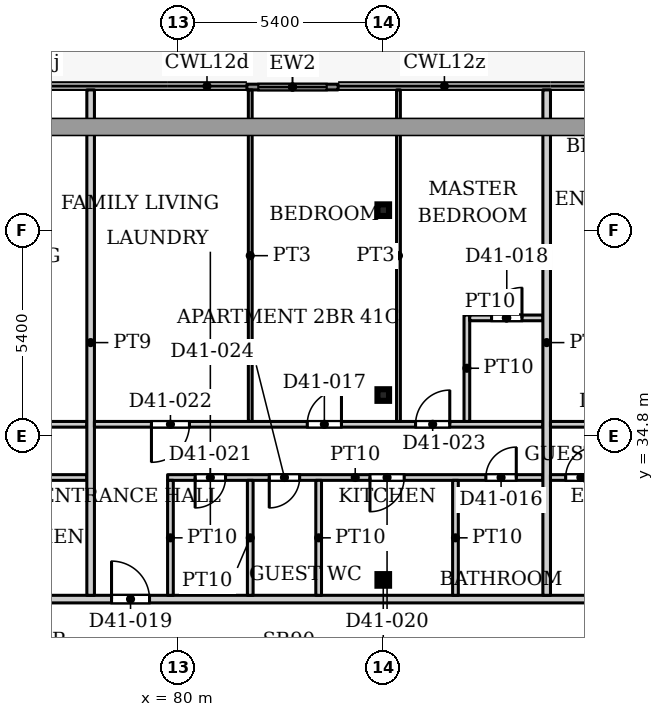
"""IFC4 building model, lengths in metres.
Left out: names, types, materials, properties, quantities, classifications, styles, units other than length and angle.
Written with IfcOpenShell. Run it as: python <this file> out.ifc"""

import sys

from ifc_helpers import new_model, si_unit, direction, frame, frame_2d, origin, origin_2d, place, context, subcontext, project, spatial, rectangle, hollow_rectangle, extrude, source, transform, mapped, element, fill, save


model = new_model("IFC4")
c1 = context("Model", 3, precision=1e-05, world=origin(), true_north=direction((0.0, 1.0)))
c2 = subcontext(c1, "Body", "Model", "MODEL_VIEW")
j1 = project(units=[si_unit("LENGTHUNIT", "METRE"), si_unit("PLANEANGLEUNIT", "RADIAN")], contexts=[c1])
p1 = place(None, origin())
s1 = spatial("IfcSite", under=j1, at=p1, CompositionType="ELEMENT")
p2 = place(p1, origin())
s2 = spatial("IfcBuilding", under=s1, at=p2, CompositionType="ELEMENT")
p3 = place(p2, frame((0.0, 0.0, 176.0)))
s3 = spatial("IfcBuildingStorey", under=s2, at=p3, CompositionType="ELEMENT", Elevation=176.0)
for number, where, z_axis, x_axis in (
    (1, (85.4, 31.005, 0.0), (0.0, 0.0, 1.0), (1.0, 0.0, 0.0)),
    (2, (85.4, 35.87, 0.0), (0.0, 0.0, 1.0), (1.0, 0.0, 0.0)),
    (3, (85.4, 40.735, 0.0), (0.0, 0.0, 1.0), (1.0, 0.0, 0.0)),
):
    element("IfcColumn", number, at=place(p3, frame(where, z_axis=z_axis, x_axis=x_axis)), inside=s3, PredefinedType="COLUMN", context=c2, shape_type="SweptSolid", body=[
        extrude(hollow_rectangle(XDim=0.305, YDim=0.305, WallThickness=0.016, InnerFilletRadius=0.016, OuterFilletRadius=0.032, at=origin_2d()), origin(), (0.0, 0.0, 1.0), 3.9),
    ])
p4 = place(p3, frame((81.812, 43.975, 0.0), z_axis=(0.0, 0.0, 1.0), x_axis=(1.0, 0.0, 0.0)))
e4 = element("IfcWall", 4, at=p4, inside=s3, PredefinedType="SOLIDWALL", context=c2, shape_type="SweptSolid", body=[
    extrude(rectangle(XDim=2.4, YDim=0.15, at=frame_2d((1.2, 0.0))), origin(), (0.0, 0.0, 1.0), 3.75),
])
p5 = place(p4, frame((0.3, 0.0, 0.0)))
e5 = element("IfcOpeningElement", 5, at=p5, cuts=e4, PredefinedType="OPENING", context=c2, shape_type="SweptSolid", body=[
    extrude(rectangle(XDim=1.8, YDim=2.4, at=frame_2d((0.9, 1.2))), frame((0.0, 0.085, 0.0), z_axis=(0.0, -1.0, 0.0), x_axis=(1.0, 0.0, 0.0)), (0.0, 0.0, 1.0), 0.17),
])
p6 = place(p3, frame((53.549, 30.5, 0.0), z_axis=(0.0, 0.0, 1.0), x_axis=(1.0, 0.0, 0.0)))
e6 = element("IfcWall", 6, at=p6, inside=s3, PredefinedType="PARTITIONING", context=c2, shape_type="SweptSolid", body=[
    extrude(rectangle(XDim=44.551, YDim=0.2, at=frame_2d((22.275, 0.0))), origin(), (0.0, 0.0, 1.0), 3.6),
])
p7 = place(p6, frame((6.851, 0.0, 0.0)))
e7 = element("IfcOpeningElement", 7, at=p7, cuts=e6, PredefinedType="OPENING", context=c2, shape_type="SweptSolid", body=[
    extrude(rectangle(XDim=1.0, YDim=2.1, at=frame_2d((0.5, 1.05))), frame((0.0, 0.11, 0.0), z_axis=(0.0, -1.0, 0.0), x_axis=(1.0, 0.0, 0.0)), (0.0, 0.0, 1.0), 0.22),
])
p8 = place(p6, frame((13.451, 0.0, 0.0)))
e8 = element("IfcOpeningElement", 8, at=p8, cuts=e6, PredefinedType="OPENING", context=c2, shape_type="SweptSolid", body=[
    extrude(rectangle(XDim=1.0, YDim=2.1, at=frame_2d((0.5, 1.05))), frame((0.0, 0.11, 0.0), z_axis=(0.0, -1.0, 0.0), x_axis=(1.0, 0.0, 0.0)), (0.0, 0.0, 1.0), 0.22),
])
p9 = place(p6, frame((24.701, 0.0, 0.0)))
e9 = element("IfcOpeningElement", 9, at=p9, cuts=e6, PredefinedType="OPENING", context=c2, shape_type="SweptSolid", body=[
    extrude(rectangle(XDim=1.0, YDim=2.1, at=frame_2d((0.5, 1.05))), frame((0.0, 0.11, 0.0), z_axis=(0.0, -1.0, 0.0), x_axis=(1.0, 0.0, 0.0)), (0.0, 0.0, 1.0), 0.22),
])
p10 = place(p6, frame((38.651, 0.0, 0.0)))
e10 = element("IfcOpeningElement", 10, at=p10, cuts=e6, PredefinedType="OPENING", context=c2, shape_type="SweptSolid", body=[
    extrude(rectangle(XDim=1.0, YDim=2.1, at=frame_2d((0.5, 1.05))), frame((0.0, 0.11, 0.0), z_axis=(0.0, -1.0, 0.0), x_axis=(1.0, 0.0, 0.0)), (0.0, 0.0, 1.0), 0.22),
])
p11 = place(p3, frame((63.4, 35.1, 0.0), z_axis=(0.0, 0.0, 1.0), x_axis=(1.0, 0.0, 0.0)))
e11 = element("IfcWall", 11, at=p11, inside=s3, PredefinedType="PARTITIONING", context=c2, shape_type="SweptSolid", body=[
    extrude(rectangle(XDim=14.2, YDim=0.15, at=frame_2d((7.1, 0.0))), origin(), (0.0, 0.0, 1.0), 3.6),
])
p12 = place(p11, frame((1.4, 0.0, 0.0)))
e12 = element("IfcOpeningElement", 12, at=p12, cuts=e11, PredefinedType="OPENING", context=c2, shape_type="SweptSolid", body=[
    extrude(rectangle(XDim=0.9, YDim=2.1, at=frame_2d((0.45, 1.05))), frame((0.0, 0.085, 0.0), z_axis=(0.0, -1.0, 0.0), x_axis=(1.0, 0.0, 0.0)), (0.0, 0.0, 1.0), 0.17),
])
p13 = place(p11, frame((10.95, 0.0, 0.0)))
e13 = element("IfcOpeningElement", 13, at=p13, cuts=e11, PredefinedType="OPENING", context=c2, shape_type="SweptSolid", body=[
    extrude(rectangle(XDim=1.0, YDim=2.1, at=frame_2d((0.5, 1.05))), frame((0.0, 0.085, 0.0), z_axis=(0.0, -1.0, 0.0), x_axis=(1.0, 0.0, 0.0)), (0.0, 0.0, 1.0), 0.17),
])
p14 = place(p11, frame((6.8, 0.0, 0.0)))
e14 = element("IfcOpeningElement", 14, at=p14, cuts=e11, PredefinedType="OPENING", context=c2, shape_type="SweptSolid", body=[
    extrude(rectangle(XDim=0.9, YDim=2.1, at=frame_2d((0.45, 1.05))), frame((0.0, 0.085, 0.0), z_axis=(0.0, -1.0, 0.0), x_axis=(1.0, 0.0, 0.0)), (0.0, 0.0, 1.0), 0.17),
])
p15 = place(p3, frame((69.525, 33.7, 0.0), z_axis=(0.0, 0.0, 1.0), x_axis=(1.0, 0.0, 0.0)))
e15 = element("IfcWall", 15, at=p15, inside=s3, PredefinedType="PARTITIONING", context=c2, shape_type="SweptSolid", body=[
    extrude(rectangle(XDim=8.075, YDim=0.15, at=frame_2d((4.038, 0.0))), origin(), (0.0, 0.0, 1.0), 3.6),
])
p16 = place(p15, frame((4.625, 0.0, 0.0)))
e16 = element("IfcOpeningElement", 16, at=p16, cuts=e15, PredefinedType="OPENING", context=c2, shape_type="SweptSolid", body=[
    extrude(rectangle(XDim=0.9, YDim=2.1, at=frame_2d((0.45, 1.05))), frame((0.0, 0.085, 0.0), z_axis=(0.0, -1.0, 0.0), x_axis=(1.0, 0.0, 0.0)), (0.0, 0.0, 1.0), 0.17),
])
p17 = place(p15, frame((1.175, 0.0, 0.0)))
e17 = element("IfcOpeningElement", 17, at=p17, cuts=e15, PredefinedType="OPENING", context=c2, shape_type="SweptSolid", body=[
    extrude(rectangle(XDim=0.8, YDim=2.1, at=frame_2d((0.4, 1.05))), frame((0.0, 0.085, 0.0), z_axis=(0.0, -1.0, 0.0), x_axis=(1.0, 0.0, 0.0)), (0.0, 0.0, 1.0), 0.17),
])
p18 = place(p3, frame((77.7, 30.6, 0.0), z_axis=(0.0, 0.0, 1.0), x_axis=(0.0, 1.0, 0.0)))
e18 = element("IfcWall", 18, at=p18, inside=s3, PredefinedType="PARTITIONING", context=c2, shape_type="SweptSolid", body=[
    extrude(rectangle(XDim=13.3, YDim=0.2, at=frame_2d((6.65, 0.0))), origin(), (0.0, 0.0, 1.0), 3.6),
])
p19 = place(p3, frame((77.8, 35.1, 0.0), z_axis=(0.0, 0.0, 1.0), x_axis=(1.0, 0.0, 0.0)))
e19 = element("IfcWall", 19, at=p19, inside=s3, PredefinedType="PARTITIONING", context=c2, shape_type="SweptSolid", body=[
    extrude(rectangle(XDim=11.8, YDim=0.15, at=frame_2d((5.9, 0.0))), origin(), (0.0, 0.0, 1.0), 3.6),
])
p20 = place(p19, frame((5.6, 0.0, 0.0)))
e20 = element("IfcOpeningElement", 20, at=p20, cuts=e19, PredefinedType="OPENING", context=c2, shape_type="SweptSolid", body=[
    extrude(rectangle(XDim=0.9, YDim=2.1, at=frame_2d((0.45, 1.05))), frame((0.0, 0.085, 0.0), z_axis=(0.0, -1.0, 0.0), x_axis=(1.0, 0.0, 0.0)), (0.0, 0.0, 1.0), 0.17),
])
p21 = place(p19, frame((1.5, 0.0, 0.0)))
e21 = element("IfcOpeningElement", 21, at=p21, cuts=e19, PredefinedType="OPENING", context=c2, shape_type="SweptSolid", body=[
    extrude(rectangle(XDim=1.0, YDim=2.1, at=frame_2d((0.5, 1.05))), frame((0.0, 0.085, 0.0), z_axis=(0.0, -1.0, 0.0), x_axis=(1.0, 0.0, 0.0)), (0.0, 0.0, 1.0), 0.17),
])
p22 = place(p19, frame((8.45, 0.0, 0.0)))
e22 = element("IfcOpeningElement", 22, at=p22, cuts=e19, PredefinedType="OPENING", context=c2, shape_type="SweptSolid", body=[
    extrude(rectangle(XDim=0.9, YDim=2.1, at=frame_2d((0.45, 1.05))), frame((0.0, 0.085, 0.0), z_axis=(0.0, -1.0, 0.0), x_axis=(1.0, 0.0, 0.0)), (0.0, 0.0, 1.0), 0.17),
])
p23 = place(p3, frame((79.725, 33.7, 0.0), z_axis=(0.0, 0.0, 1.0), x_axis=(1.0, 0.0, 0.0)))
e23 = element("IfcWall", 23, at=p23, inside=s3, PredefinedType="PARTITIONING", context=c2, shape_type="SweptSolid", body=[
    extrude(rectangle(XDim=9.875, YDim=0.15, at=frame_2d((4.938, 0.0))), origin(), (0.0, 0.0, 1.0), 3.6),
])
p24 = place(p23, frame((8.375, 0.0, 0.0)))
e24 = element("IfcOpeningElement", 24, at=p24, cuts=e23, PredefinedType="OPENING", context=c2, shape_type="SweptSolid", body=[
    extrude(rectangle(XDim=0.8, YDim=2.1, at=frame_2d((0.4, 1.05))), frame((0.0, 0.085, 0.0), z_axis=(0.0, -1.0, 0.0), x_axis=(1.0, 0.0, 0.0)), (0.0, 0.0, 1.0), 0.17),
])
p25 = place(p23, frame((5.325, 0.0, 0.0)))
e25 = element("IfcOpeningElement", 25, at=p25, cuts=e23, PredefinedType="OPENING", context=c2, shape_type="SweptSolid", body=[
    extrude(rectangle(XDim=0.9, YDim=2.1, at=frame_2d((0.45, 1.05))), frame((0.0, 0.085, 0.0), z_axis=(0.0, -1.0, 0.0), x_axis=(1.0, 0.0, 0.0)), (0.0, 0.0, 1.0), 0.17),
])
p26 = place(p23, frame((0.725, 0.0, 0.0)))
e26 = element("IfcOpeningElement", 26, at=p26, cuts=e23, PredefinedType="OPENING", context=c2, shape_type="SweptSolid", body=[
    extrude(rectangle(XDim=0.8, YDim=2.1, at=frame_2d((0.4, 1.05))), frame((0.0, 0.085, 0.0), z_axis=(0.0, -1.0, 0.0), x_axis=(1.0, 0.0, 0.0)), (0.0, 0.0, 1.0), 0.17),
])
p27 = place(p23, frame((2.675, 0.0, 0.0)))
e27 = element("IfcOpeningElement", 27, at=p27, cuts=e23, PredefinedType="OPENING", context=c2, shape_type="SweptSolid", body=[
    extrude(rectangle(XDim=0.8, YDim=2.1, at=frame_2d((0.4, 1.05))), frame((0.0, 0.085, 0.0), z_axis=(0.0, -1.0, 0.0), x_axis=(1.0, 0.0, 0.0)), (0.0, 0.0, 1.0), 0.17),
])
for number, where, z_axis, x_axis in (
    (28, (79.8, 30.6, 0.0), (0.0, 0.0, 1.0), (0.0, 1.0, 0.0)),
    (29, (81.9, 30.6, 0.0), (0.0, 0.0, 1.0), (0.0, 1.0, 0.0)),
):
    element("IfcWall", number, at=place(p3, frame(where, z_axis=z_axis, x_axis=x_axis)), inside=s3, PredefinedType="PARTITIONING", context=c2, shape_type="SweptSolid", body=[
        extrude(rectangle(XDim=3.025, YDim=0.15, at=frame_2d((1.512, 0.0))), origin(), (0.0, 0.0, 1.0), 3.6),
    ])
p28 = place(p3, frame((81.9, 35.175, 0.0), z_axis=(0.0, 0.0, 1.0), x_axis=(0.0, 1.0, 0.0)))
e30 = element("IfcWall", 30, at=p28, inside=s3, PredefinedType="PARTITIONING", context=c2, shape_type="SweptSolid", body=[
    extrude(rectangle(XDim=8.725, YDim=0.1, at=frame_2d((4.362, 0.0))), origin(), (0.0, 0.0, 1.0), 3.6),
])
p29 = place(p3, frame((83.7, 30.6, 0.0), z_axis=(0.0, 0.0, 1.0), x_axis=(0.0, 1.0, 0.0)))
e31 = element("IfcWall", 31, at=p29, inside=s3, PredefinedType="PARTITIONING", context=c2, shape_type="SweptSolid", body=[
    extrude(rectangle(XDim=3.025, YDim=0.15, at=frame_2d((1.512, 0.0))), origin(), (0.0, 0.0, 1.0), 3.6),
])
p30 = place(p3, frame((85.8, 35.175, 0.0), z_axis=(0.0, 0.0, 1.0), x_axis=(0.0, 1.0, 0.0)))
e32 = element("IfcWall", 32, at=p30, inside=s3, PredefinedType="PARTITIONING", context=c2, shape_type="SweptSolid", body=[
    extrude(rectangle(XDim=8.725, YDim=0.1, at=frame_2d((4.362, 0.0))), origin(), (0.0, 0.0, 1.0), 3.6),
])
p31 = place(p3, frame((87.3, 30.6, 0.0), z_axis=(0.0, 0.0, 1.0), x_axis=(0.0, 1.0, 0.0)))
e33 = element("IfcWall", 33, at=p31, inside=s3, PredefinedType="PARTITIONING", context=c2, shape_type="SweptSolid", body=[
    extrude(rectangle(XDim=3.025, YDim=0.15, at=frame_2d((1.512, 0.0))), origin(), (0.0, 0.0, 1.0), 3.6),
])
p32 = place(p3, frame((87.6, 35.175, 0.0), z_axis=(0.0, 0.0, 1.0), x_axis=(0.0, 1.0, 0.0)))
e34 = element("IfcWall", 34, at=p32, inside=s3, PredefinedType="PARTITIONING", context=c2, shape_type="SweptSolid", body=[
    extrude(rectangle(XDim=2.8, YDim=0.15, at=frame_2d((1.4, 0.0))), origin(), (0.0, 0.0, 1.0), 3.6),
])
p33 = place(p3, frame((87.675, 37.9, 0.0), z_axis=(0.0, 0.0, 1.0), x_axis=(1.0, 0.0, 0.0)))
e35 = element("IfcWall", 35, at=p33, inside=s3, PredefinedType="PARTITIONING", context=c2, shape_type="SweptSolid", body=[
    extrude(rectangle(XDim=1.925, YDim=0.15, at=frame_2d((0.962, 0.0))), origin(), (0.0, 0.0, 1.0), 3.6),
])
p34 = place(p33, frame((0.575, 0.0, 0.0)))
e36 = element("IfcOpeningElement", 36, at=p34, cuts=e35, PredefinedType="OPENING", context=c2, shape_type="SweptSolid", body=[
    extrude(rectangle(XDim=0.8, YDim=2.1, at=frame_2d((0.4, 1.05))), frame((0.0, 0.085, 0.0), z_axis=(0.0, -1.0, 0.0), x_axis=(1.0, 0.0, 0.0)), (0.0, 0.0, 1.0), 0.17),
])
p35 = place(p3, frame((89.7, 30.6, 0.0), z_axis=(0.0, 0.0, 1.0), x_axis=(0.0, 1.0, 0.0)))
e37 = element("IfcWall", 37, at=p35, inside=s3, PredefinedType="PARTITIONING", context=c2, shape_type="SweptSolid", body=[
    extrude(rectangle(XDim=13.3, YDim=0.2, at=frame_2d((6.65, 0.0))), origin(), (0.0, 0.0, 1.0), 3.6),
])
p36 = place(p3, frame((89.8, 33.7, 0.0), z_axis=(0.0, 0.0, 1.0), x_axis=(1.0, 0.0, 0.0)))
e38 = element("IfcWall", 38, at=p36, inside=s3, PredefinedType="PARTITIONING", context=c2, shape_type="SweptSolid", body=[
    extrude(rectangle(XDim=1.625, YDim=0.15, at=frame_2d((0.812, 0.0))), origin(), (0.0, 0.0, 1.0), 3.6),
])
p37 = place(p36, frame((0.4, 0.0, 0.0)))
e39 = element("IfcOpeningElement", 39, at=p37, cuts=e38, PredefinedType="OPENING", context=c2, shape_type="SweptSolid", body=[
    extrude(rectangle(XDim=0.8, YDim=2.1, at=frame_2d((0.4, 1.05))), frame((0.0, 0.085, 0.0), z_axis=(0.0, -1.0, 0.0), x_axis=(1.0, 0.0, 0.0)), (0.0, 0.0, 1.0), 0.17),
])
p38 = place(p3, frame((89.8, 35.1, 0.0), z_axis=(0.0, 0.0, 1.0), x_axis=(1.0, 0.0, 0.0)))
e40 = element("IfcWall", 40, at=p38, inside=s3, PredefinedType="PARTITIONING", context=c2, shape_type="SweptSolid", body=[
    extrude(rectangle(XDim=10.1, YDim=0.15, at=frame_2d((5.05, 0.0))), origin(), (0.0, 0.0, 1.0), 3.6),
])
p39 = place(p38, frame((1.4, 0.0, 0.0)))
e41 = element("IfcOpeningElement", 41, at=p39, cuts=e40, PredefinedType="OPENING", context=c2, shape_type="SweptSolid", body=[
    extrude(rectangle(XDim=0.9, YDim=2.1, at=frame_2d((0.45, 1.05))), frame((0.0, 0.085, 0.0), z_axis=(0.0, -1.0, 0.0), x_axis=(1.0, 0.0, 0.0)), (0.0, 0.0, 1.0), 0.17),
])
p40 = place(p38, frame((6.45, 0.0, 0.0)))
e42 = element("IfcOpeningElement", 42, at=p40, cuts=e40, PredefinedType="OPENING", context=c2, shape_type="SweptSolid", body=[
    extrude(rectangle(XDim=1.0, YDim=2.1, at=frame_2d((0.5, 1.05))), frame((0.0, 0.085, 0.0), z_axis=(0.0, -1.0, 0.0), x_axis=(1.0, 0.0, 0.0)), (0.0, 0.0, 1.0), 0.17),
])
m1 = source(origin(), c2, "Body", "SweptSolid", [
    extrude(rectangle(XDim=1.8, YDim=2.4, at=frame_2d((0.9, 1.2))), frame((0.0, 0.025, 0.0), z_axis=(0.0, -1.0, 0.0), x_axis=(1.0, 0.0, 0.0)), (0.0, 0.0, 1.0), 0.05),
])
p41 = place(p5, origin())
e43 = element("IfcDoor", 43, at=p41, inside=s3, OperationType="SLIDING_TO_LEFT", PredefinedType="DOOR", context=c2, shape_type="MappedRepresentation", body=[
    mapped(m1, transform((0.0, 0.0, 0.0), x_axis=(1.0, 0.0, 0.0), y_axis=(0.0, 1.0, 0.0), z_axis=(0.0, 0.0, 1.0), scale=1.0)),
])
fill(e5, e43)
m2 = source(origin(), c2, "Body", "SweptSolid", [
    extrude(rectangle(XDim=0.8, YDim=2.1, at=frame_2d((0.4, 1.05))), frame((0.0, 0.025, 0.0), z_axis=(0.0, -1.0, 0.0), x_axis=(1.0, 0.0, 0.0)), (0.0, 0.0, 1.0), 0.05),
])
p42 = place(p24, origin())
e44 = element("IfcDoor", 44, at=p42, inside=s3, OperationType="SINGLE_SWING_LEFT", PredefinedType="DOOR", context=c2, shape_type="MappedRepresentation", body=[
    mapped(m2, transform((0.0, 0.0, 0.0), x_axis=(1.0, 0.0, 0.0), y_axis=(0.0, 1.0, 0.0), z_axis=(0.0, 0.0, 1.0), scale=1.0)),
])
fill(e24, e44)
m3 = source(origin(), c2, "Body", "SweptSolid", [
    extrude(rectangle(XDim=0.9, YDim=2.1, at=frame_2d((0.45, 1.05))), frame((0.0, 0.025, 0.0), z_axis=(0.0, -1.0, 0.0), x_axis=(1.0, 0.0, 0.0)), (0.0, 0.0, 1.0), 0.05),
])
p43 = place(p20, origin())
e45 = element("IfcDoor", 45, at=p43, inside=s3, OperationType="SINGLE_SWING_LEFT", PredefinedType="DOOR", context=c2, shape_type="MappedRepresentation", body=[
    mapped(m3, transform((0.0, 0.0, 0.0), x_axis=(1.0, 0.0, 0.0), y_axis=(0.0, 1.0, 0.0), z_axis=(0.0, 0.0, 1.0), scale=1.0)),
])
fill(e20, e45)
p44 = place(p34, origin())
e46 = element("IfcDoor", 46, at=p44, inside=s3, OperationType="SINGLE_SWING_LEFT", PredefinedType="DOOR", context=c2, shape_type="MappedRepresentation", body=[
    mapped(m2, transform((0.0, 0.0, 0.0), x_axis=(1.0, 0.0, 0.0), y_axis=(0.0, 1.0, 0.0), z_axis=(0.0, 0.0, 1.0), scale=1.0)),
])
fill(e36, e46)
m4 = source(origin(), c2, "Body", "SweptSolid", [
    extrude(rectangle(XDim=1.0, YDim=2.1, at=frame_2d((0.5, 1.05))), frame((0.0, 0.025, 0.0), z_axis=(0.0, -1.0, 0.0), x_axis=(1.0, 0.0, 0.0)), (0.0, 0.0, 1.0), 0.05),
])
p45 = place(p9, origin())
e47 = element("IfcDoor", 47, at=p45, inside=s3, OperationType="SINGLE_SWING_LEFT", PredefinedType="DOOR", context=c2, shape_type="MappedRepresentation", body=[
    mapped(m4, transform((0.0, 0.0, 0.0), x_axis=(1.0, 0.0, 0.0), y_axis=(0.0, 1.0, 0.0), z_axis=(0.0, 0.0, 1.0), scale=1.0)),
])
fill(e9, e47)
p46 = place(p25, origin())
e48 = element("IfcDoor", 48, at=p46, inside=s3, OperationType="SINGLE_SWING_RIGHT", PredefinedType="DOOR", context=c2, shape_type="MappedRepresentation", body=[
    mapped(m3, transform((0.0, 0.0, 0.0), x_axis=(1.0, 0.0, 0.0), y_axis=(0.0, 1.0, 0.0), z_axis=(0.0, 0.0, 1.0), scale=1.0)),
])
fill(e25, e48)
p47 = place(p26, origin())
e49 = element("IfcDoor", 49, at=p47, inside=s3, OperationType="SINGLE_SWING_RIGHT", PredefinedType="DOOR", context=c2, shape_type="MappedRepresentation", body=[
    mapped(m2, transform((0.0, 0.0, 0.0), x_axis=(1.0, 0.0, 0.0), y_axis=(0.0, 1.0, 0.0), z_axis=(0.0, 0.0, 1.0), scale=1.0)),
])
fill(e26, e49)
m5 = source(origin(), c2, "Body", "SweptSolid", [
    extrude(rectangle(XDim=1.0, YDim=2.1, at=frame_2d((0.5, 1.05))), frame((0.0, 0.025, 0.0), z_axis=(0.0, -1.0, 0.0), x_axis=(1.0, 0.0, 0.0)), (0.0, 0.0, 1.0), 0.05),
])
p48 = place(p21, origin())
e50 = element("IfcDoor", 50, at=p48, inside=s3, OperationType="SINGLE_SWING_RIGHT", PredefinedType="DOOR", context=c2, shape_type="MappedRepresentation", body=[
    mapped(m5, transform((0.0, 0.0, 0.0), x_axis=(1.0, 0.0, 0.0), y_axis=(0.0, 1.0, 0.0), z_axis=(0.0, 0.0, 1.0), scale=1.0)),
])
fill(e21, e50)
p49 = place(p22, origin())
e51 = element("IfcDoor", 51, at=p49, inside=s3, OperationType="SINGLE_SWING_LEFT", PredefinedType="DOOR", context=c2, shape_type="MappedRepresentation", body=[
    mapped(m3, transform((0.0, 0.0, 0.0), x_axis=(1.0, 0.0, 0.0), y_axis=(0.0, 1.0, 0.0), z_axis=(0.0, 0.0, 1.0), scale=1.0)),
])
fill(e22, e51)
p50 = place(p27, origin())
e52 = element("IfcDoor", 52, at=p50, inside=s3, OperationType="SINGLE_SWING_RIGHT", PredefinedType="DOOR", context=c2, shape_type="MappedRepresentation", body=[
    mapped(m2, transform((0.0, 0.0, 0.0), x_axis=(1.0, 0.0, 0.0), y_axis=(0.0, 1.0, 0.0), z_axis=(0.0, 0.0, 1.0), scale=1.0)),
])
fill(e27, e52)
p51 = place(p37, origin())
e53 = element("IfcDoor", 53, at=p51, inside=s3, OperationType="SINGLE_SWING_LEFT", PredefinedType="DOOR", context=c2, shape_type="MappedRepresentation", body=[
    mapped(m2, transform((0.0, 0.0, 0.0), x_axis=(1.0, 0.0, 0.0), y_axis=(0.0, 1.0, 0.0), z_axis=(0.0, 0.0, 1.0), scale=1.0)),
])
fill(e39, e53)
save(model, sys.argv[1])
